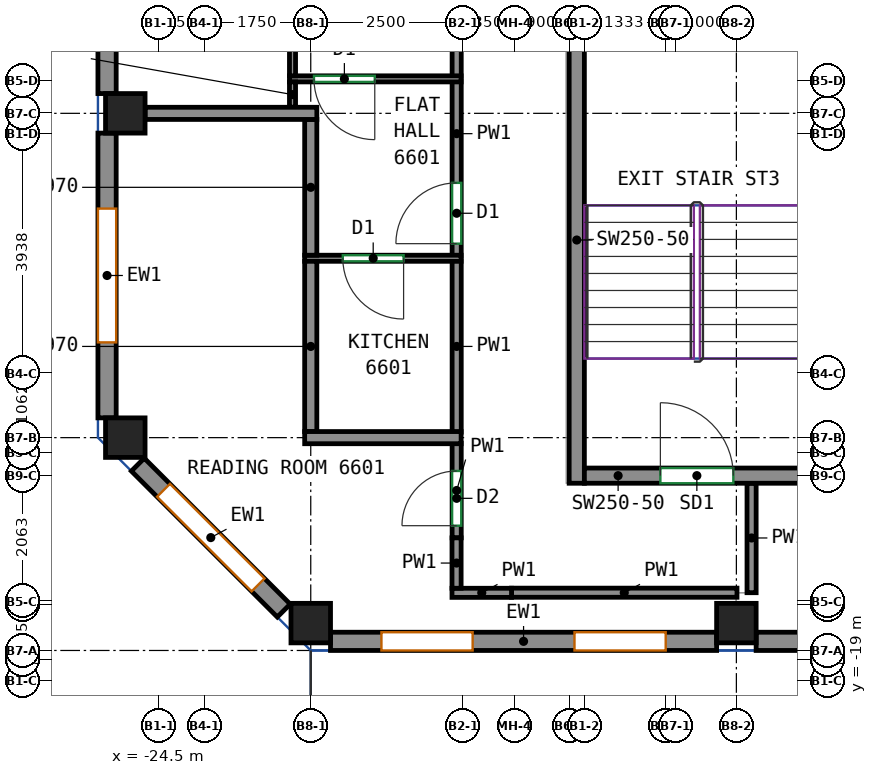
"""IFC4 building model, lengths in metres.
Left out: names, types, materials, properties, quantities, classifications, styles, units other than length and angle.
Written with IfcOpenShell. Run it as: python <this file> out.ifc"""

import sys

from ifc_helpers import new_model, si_unit, direction, frame, frame_2d, origin, origin_2d, place, context, subcontext, project, spatial, rectangle, extrude, source, transform, mapped, element, fill, save


model = new_model("IFC4")
c1 = context("Model", 3, precision=1e-05, world=origin(), true_north=direction((0.0, 1.0)))
c2 = subcontext(c1, "Body", "Model", "MODEL_VIEW")
j1 = project(units=[si_unit("LENGTHUNIT", "METRE"), si_unit("PLANEANGLEUNIT", "RADIAN")], contexts=[c1])
p1 = place(None, origin())
s1 = spatial("IfcSite", under=j1, at=p1, CompositionType="ELEMENT")
p2 = place(p1, origin())
s2 = spatial("IfcBuilding", under=s1, at=p2, CompositionType="ELEMENT")
p3 = place(p2, frame((0.0, 0.0, 270.4)))
s3 = spatial("IfcBuildingStorey", under=s2, at=p3, CompositionType="ELEMENT", Elevation=270.4)
m1 = source(origin(), c2, "Body", "SweptSolid", [
    extrude(rectangle(XDim=0.65, YDim=0.65, at=origin_2d()), origin(), (0.0, 0.0, 1.0), 3.12),
])
for number, where, z_axis, x_axis in (
    (1, (-25.05, -15.0, 0.0), (0.0, 0.0, 1.0), (1.0, 0.0, 0.0)),
    (2, (-25.05, -9.667, 0.0), (0.0, 0.0, 1.0), (1.0, 0.0, 0.0)),
    (3, (-22.0, -18.05, 0.0), (0.0, 0.0, 1.0), (1.0, 0.0, 0.0)),
    (4, (-15.0, -18.05, 0.0), (0.0, 0.0, 1.0), (1.0, 0.0, 0.0)),
):
    element("IfcColumn", number, at=place(p3, frame(where, z_axis=z_axis, x_axis=x_axis)), inside=s3, PredefinedType="COLUMN", context=c2, shape_type="MappedRepresentation", body=[
        mapped(m1, transform((0.0, 0.0, 0.0))),
    ])
m2 = source(origin(), c2, "Body", "SweptSolid", [
    extrude(rectangle(XDim=8.0, YDim=0.25, at=frame_2d((4.0, 0.0))), origin(), (0.0, 0.0, 1.0), 3.12),
])
p4 = place(p3, frame((-17.625, -15.75, 0.0), z_axis=(0.0, 0.0, 1.0), x_axis=(0.0, 1.0, 0.0)))
e5 = element("IfcWall", 5, at=p4, inside=s3, PredefinedType="SHEAR", context=c2, shape_type="MappedRepresentation", body=[
    mapped(m2, transform((0.0, 0.0, 0.0))),
])
m3 = source(origin(), c2, "Body", "SweptSolid", [
    extrude(rectangle(XDim=3.7, YDim=0.25, at=frame_2d((1.85, 0.0))), origin(), (0.0, 0.0, 1.0), 3.12),
])
p5 = place(p3, frame((-17.5, -15.625, 0.0), z_axis=(0.0, 0.0, 1.0), x_axis=(1.0, 0.0, 0.0)))
e6 = element("IfcWall", 6, at=p5, inside=s3, PredefinedType="SHEAR", context=c2, shape_type="MappedRepresentation", body=[
    mapped(m3, transform((0.0, 0.0, 0.0))),
])
p6 = place(p5, frame((1.25, 0.0, 0.0)))
e7 = element("IfcOpeningElement", 7, at=p6, cuts=e6, PredefinedType="OPENING", context=c2, shape_type="SweptSolid", body=[
    extrude(rectangle(XDim=1.2, YDim=2.1, at=frame_2d((0.6, 1.05))), frame((0.0, 0.135, 0.0), z_axis=(0.0, -1.0, 0.0), x_axis=(1.0, 0.0, 0.0)), (0.0, 0.0, 1.0), 0.27),
])
m4 = source(origin(), c2, "Body", "SweptSolid", [
    extrude(rectangle(XDim=6.35, YDim=0.3, at=frame_2d((3.175, 0.0))), origin(), (0.0, 0.0, 1.0), 3.12),
])
p7 = place(p3, frame((-21.675, -18.35, 0.0), z_axis=(0.0, 0.0, 1.0), x_axis=(1.0, 0.0, 0.0)))
e8 = element("IfcWall", 8, at=p7, inside=s3, PredefinedType="SOLIDWALL", context=c2, shape_type="MappedRepresentation", body=[
    mapped(m4, transform((0.0, 0.0, 0.0))),
])
p8 = place(p7, frame((0.837, 0.0, 0.8)))
e9 = element("IfcOpeningElement", 9, at=p8, cuts=e8, PredefinedType="OPENING", context=c2, shape_type="SweptSolid", body=[
    extrude(rectangle(XDim=1.5, YDim=2.05, at=frame_2d((0.75, 1.025))), frame((0.0, 0.16, 0.0), z_axis=(0.0, -1.0, 0.0), x_axis=(1.0, 0.0, 0.0)), (0.0, 0.0, 1.0), 0.32),
])
p9 = place(p7, frame((4.012, 0.0, 0.8)))
e10 = element("IfcOpeningElement", 10, at=p9, cuts=e8, PredefinedType="OPENING", context=c2, shape_type="SweptSolid", body=[
    extrude(rectangle(XDim=1.5, YDim=2.05, at=frame_2d((0.75, 1.025))), frame((0.0, 0.16, 0.0), z_axis=(0.0, -1.0, 0.0), x_axis=(1.0, 0.0, 0.0)), (0.0, 0.0, 1.0), 0.32),
])
p10 = place(p3, frame((-14.675, -18.35, 0.0), z_axis=(0.0, 0.0, 1.0), x_axis=(1.0, 0.0, 0.0)))
e11 = element("IfcWall", 11, at=p10, inside=s3, PredefinedType="SOLIDWALL", context=c2, shape_type="MappedRepresentation", body=[
    mapped(m4, transform((0.0, 0.0, 0.0))),
])
p11 = place(p10, frame((0.837, 0.0, 0.8)))
e12 = element("IfcOpeningElement", 12, at=p11, cuts=e11, PredefinedType="OPENING", context=c2, shape_type="SweptSolid", body=[
    extrude(rectangle(XDim=1.5, YDim=2.05, at=frame_2d((0.75, 1.025))), frame((0.0, 0.16, 0.0), z_axis=(0.0, -1.0, 0.0), x_axis=(1.0, 0.0, 0.0)), (0.0, 0.0, 1.0), 0.32),
])
p12 = place(p10, frame((4.012, 0.0, 0.8)))
e13 = element("IfcOpeningElement", 13, at=p12, cuts=e11, PredefinedType="OPENING", context=c2, shape_type="SweptSolid", body=[
    extrude(rectangle(XDim=1.5, YDim=2.05, at=frame_2d((0.75, 1.025))), frame((0.0, 0.16, 0.0), z_axis=(0.0, -1.0, 0.0), x_axis=(1.0, 0.0, 0.0)), (0.0, 0.0, 1.0), 0.32),
])
m5 = source(origin(), c2, "Body", "SweptSolid", [
    extrude(rectangle(XDim=8.184, YDim=0.3, at=frame_2d((4.092, 0.0))), origin(), (0.0, 0.0, 1.0), 3.12),
])
p13 = place(p3, frame((-25.35, -1.158, 0.0), z_axis=(0.0, 0.0, 1.0), x_axis=(0.0, -1.0, 0.0)))
e14 = element("IfcWall", 14, at=p13, inside=s3, PredefinedType="SOLIDWALL", context=c2, shape_type="MappedRepresentation", body=[
    mapped(m5, transform((0.0, 0.0, 0.0))),
])
p14 = place(p13, frame((0.946, 0.0, 0.8)))
e15 = element("IfcOpeningElement", 15, at=p14, cuts=e14, PredefinedType="OPENING", context=c2, shape_type="SweptSolid", body=[
    extrude(rectangle(XDim=2.2, YDim=2.05, at=frame_2d((1.1, 1.025))), frame((0.0, 0.16, 0.0), z_axis=(0.0, -1.0, 0.0), x_axis=(1.0, 0.0, 0.0)), (0.0, 0.0, 1.0), 0.32),
])
p15 = place(p13, frame((5.038, 0.0, 0.8)))
e16 = element("IfcOpeningElement", 16, at=p15, cuts=e14, PredefinedType="OPENING", context=c2, shape_type="SweptSolid", body=[
    extrude(rectangle(XDim=2.2, YDim=2.05, at=frame_2d((1.1, 1.025))), frame((0.0, 0.16, 0.0), z_axis=(0.0, -1.0, 0.0), x_axis=(1.0, 0.0, 0.0)), (0.0, 0.0, 1.0), 0.32),
])
m6 = source(origin(), c2, "Body", "SweptSolid", [
    extrude(rectangle(XDim=4.683, YDim=0.3, at=frame_2d((2.342, 0.0))), origin(), (0.0, 0.0, 1.0), 3.12),
])
p16 = place(p3, frame((-25.35, -9.992, 0.0), z_axis=(0.0, 0.0, 1.0), x_axis=(0.0, -1.0, 0.0)))
e17 = element("IfcWall", 17, at=p16, inside=s3, PredefinedType="SOLIDWALL", context=c2, shape_type="MappedRepresentation", body=[
    mapped(m6, transform((0.0, 0.0, 0.0))),
])
p17 = place(p16, frame((1.242, 0.0, 0.8)))
e18 = element("IfcOpeningElement", 18, at=p17, cuts=e17, PredefinedType="OPENING", context=c2, shape_type="SweptSolid", body=[
    extrude(rectangle(XDim=2.2, YDim=2.05, at=frame_2d((1.1, 1.025))), frame((0.0, 0.16, 0.0), z_axis=(0.0, -1.0, 0.0), x_axis=(1.0, 0.0, 0.0)), (0.0, 0.0, 1.0), 0.32),
])
m7 = source(origin(), c2, "Body", "SweptSolid", [
    extrude(rectangle(XDim=3.394, YDim=0.3, at=frame_2d((1.697, 0.0))), origin(), (0.0, 0.0, 1.0), 3.12),
])
p18 = place(p3, frame((-24.844, -15.444, 0.0), z_axis=(0.0, 0.0, 1.0), x_axis=(0.707070815327, -0.707142745217, 0.0)))
e19 = element("IfcWall", 19, at=p18, inside=s3, PredefinedType="SOLIDWALL", context=c2, shape_type="MappedRepresentation", body=[
    mapped(m7, transform((0.0, 0.0, 0.0))),
])
p19 = place(p18, frame((0.597, 0.0, 0.8)))
e20 = element("IfcOpeningElement", 20, at=p19, cuts=e19, PredefinedType="OPENING", context=c2, shape_type="SweptSolid", body=[
    extrude(rectangle(XDim=2.2, YDim=2.05, at=frame_2d((1.1, 1.025))), frame((0.0, 0.16, 0.0), z_axis=(0.0, -1.0, 0.0), x_axis=(1.0, 0.0, 0.0)), (0.0, 0.0, 1.0), 0.32),
])
p20 = place(p3, frame((-19.6, -14.91, 0.0), z_axis=(0.0, 0.0, 1.0), x_axis=(0.0, 1.0, 0.0)))
e21 = element("IfcWall", 21, at=p20, inside=s3, PredefinedType="PARTITIONING", context=c2, shape_type="SweptSolid", body=[
    extrude(rectangle(XDim=2.82, YDim=0.15, at=frame_2d((1.41, 0.0))), origin(), (0.0, 0.0, 1.0), 3.12),
])
p21 = place(p3, frame((-19.6, -12.01, 0.0), z_axis=(0.0, 0.0, 1.0), x_axis=(0.0, 1.0, 0.0)))
e22 = element("IfcWall", 22, at=p21, inside=s3, PredefinedType="PARTITIONING", context=c2, shape_type="SweptSolid", body=[
    extrude(rectangle(XDim=2.87, YDim=0.15, at=frame_2d((1.435, 0.0))), origin(), (0.0, 0.0, 1.0), 3.12),
])
p22 = place(p21, frame((0.2, 0.0, 0.0)))
e23 = element("IfcOpeningElement", 23, at=p22, cuts=e22, PredefinedType="OPENING", context=c2, shape_type="SweptSolid", body=[
    extrude(rectangle(XDim=1.0, YDim=2.1, at=frame_2d((0.5, 1.05))), frame((0.0, 0.085, 0.0), z_axis=(0.0, -1.0, 0.0), x_axis=(1.0, 0.0, 0.0)), (0.0, 0.0, 1.0), 0.17),
])
p23 = place(p3, frame((-19.6, -9.06, 0.0), z_axis=(0.0, 0.0, 1.0), x_axis=(0.0, 1.0, 0.0)))
e24 = element("IfcWall", 24, at=p23, inside=s3, PredefinedType="PARTITIONING", context=c2, shape_type="SweptSolid", body=[
    extrude(rectangle(XDim=1.608, YDim=0.15, at=frame_2d((0.804, 0.0))), origin(), (0.0, 0.0, 1.0), 3.12),
])
p24 = place(p3, frame((-14.75, -17.55, 0.0), z_axis=(0.0, 0.0, 1.0), x_axis=(0.0, 1.0, 0.0)))
e25 = element("IfcWall", 25, at=p24, inside=s3, PredefinedType="PARTITIONING", context=c2, shape_type="SweptSolid", body=[
    extrude(rectangle(XDim=1.8, YDim=0.15, at=frame_2d((0.9, 0.0))), origin(), (0.0, 0.0, 1.0), 3.12),
])
p25 = place(p3, frame((-19.6, -16.648, 0.0), z_axis=(0.0, 0.0, 1.0), x_axis=(0.0, 1.0, 0.0)))
e26 = element("IfcWall", 26, at=p25, inside=s3, PredefinedType="PARTITIONING", context=c2, shape_type="SweptSolid", body=[
    extrude(rectangle(XDim=1.558, YDim=0.15, at=frame_2d((0.779, 0.0))), origin(), (0.0, 0.0, 1.0), 3.12),
])
p26 = place(p25, frame((0.2, 0.0, 0.0)))
e27 = element("IfcOpeningElement", 27, at=p26, cuts=e26, PredefinedType="OPENING", context=c2, shape_type="SweptSolid", body=[
    extrude(rectangle(XDim=0.9, YDim=2.1, at=frame_2d((0.45, 1.05))), frame((0.0, 0.085, 0.0), z_axis=(0.0, -1.0, 0.0), x_axis=(1.0, 0.0, 0.0)), (0.0, 0.0, 1.0), 0.17),
])
p27 = place(p3, frame((-18.698, -17.55, 0.0), z_axis=(0.0, 0.0, 1.0), x_axis=(1.0, 0.0, 0.0)))
e28 = element("IfcWall", 28, at=p27, inside=s3, PredefinedType="PARTITIONING", context=c2, shape_type="SweptSolid", body=[
    extrude(rectangle(XDim=3.708, YDim=0.15, at=frame_2d((1.854, 0.0))), origin(), (0.0, 0.0, 1.0), 3.12),
])
p28 = place(p3, frame((-19.677, -17.552, 0.0), z_axis=(0.0, 0.0, 1.0), x_axis=(1.0, 0.0, 0.0)))
e29 = element("IfcWall", 29, at=p28, inside=s3, PredefinedType="PARTITIONING", context=c2, shape_type="SweptSolid", body=[
    extrude(rectangle(XDim=0.979, YDim=0.15, at=frame_2d((0.49, 0.0))), origin(), (0.0, 0.0, 1.0), 3.12),
])
p29 = place(p3, frame((-19.602, -17.477, 0.0), z_axis=(0.0, 0.0, 1.0), x_axis=(0.0, 1.0, 0.0)))
e30 = element("IfcWall", 30, at=p29, inside=s3, PredefinedType="PARTITIONING", context=c2, shape_type="SweptSolid", body=[
    extrude(rectangle(XDim=0.829, YDim=0.15, at=frame_2d((0.415, 0.0))), origin(), (0.0, 0.0, 1.0), 3.12),
])
p30 = place(p3, frame((-19.527, -12.05, 0.0), z_axis=(0.0, 0.0, 1.0), x_axis=(-1.0, 0.0, 0.0)))
e31 = element("IfcWall", 31, at=p30, inside=s3, PredefinedType="PARTITIONING", context=c2, shape_type="SweptSolid", body=[
    extrude(rectangle(XDim=2.573, YDim=0.1, at=frame_2d((1.287, 0.0))), origin(), (0.0, 0.0, 1.0), 3.12),
])
p31 = place(p30, frame((0.946, 0.0, 0.0)))
e32 = element("IfcOpeningElement", 32, at=p31, cuts=e31, PredefinedType="OPENING", context=c2, shape_type="SweptSolid", body=[
    extrude(rectangle(XDim=1.0, YDim=2.1, at=frame_2d((0.5, 1.05))), frame((0.0, 0.06, 0.0), z_axis=(0.0, -1.0, 0.0), x_axis=(1.0, 0.0, 0.0)), (0.0, 0.0, 1.0), 0.12),
])
p32 = place(p3, frame((-22.0, -14.9, 0.0), z_axis=(0.0, 0.0, 1.0), x_axis=(0.0, 1.0, 0.0)))
e33 = element("IfcWall", 33, at=p32, inside=s3, PredefinedType="PARTITIONING", context=c2, shape_type="SweptSolid", body=[
    extrude(rectangle(XDim=2.8, YDim=0.2, at=frame_2d((1.4, 0.0))), origin(), (0.0, 0.0, 1.0), 2.57),
])
p33 = place(p3, frame((-22.1, -15.0, 0.0), z_axis=(0.0, 0.0, 1.0), x_axis=(1.0, 0.0, 0.0)))
e34 = element("IfcWall", 34, at=p33, inside=s3, PredefinedType="PARTITIONING", context=c2, shape_type="SweptSolid", body=[
    extrude(rectangle(XDim=2.573, YDim=0.2, at=frame_2d((1.287, 0.0))), origin(), (0.0, 0.0, 1.0), 3.12),
])
p34 = place(p3, frame((-19.527, -9.1, 0.0), z_axis=(0.0, 0.0, 1.0), x_axis=(-1.0, 0.0, 0.0)))
e35 = element("IfcWall", 35, at=p34, inside=s3, PredefinedType="PARTITIONING", context=c2, shape_type="SweptSolid", body=[
    extrude(rectangle(XDim=2.823, YDim=0.1, at=frame_2d((1.412, 0.0))), origin(), (0.0, 0.0, 1.0), 3.12),
])
p35 = place(p34, frame((1.42, 0.0, 0.0)))
e36 = element("IfcOpeningElement", 36, at=p35, cuts=e35, PredefinedType="OPENING", context=c2, shape_type="SweptSolid", body=[
    extrude(rectangle(XDim=1.0, YDim=2.1, at=frame_2d((0.5, 1.05))), frame((0.0, 0.06, 0.0), z_axis=(0.0, -1.0, 0.0), x_axis=(1.0, 0.0, 0.0)), (0.0, 0.0, 1.0), 0.12),
])
p36 = place(p3, frame((-22.3, -9.567, 0.0), z_axis=(0.0, 0.0, 1.0), x_axis=(0.0, 1.0, 0.0)))
e37 = element("IfcWall", 37, at=p36, inside=s3, PredefinedType="PARTITIONING", context=c2, shape_type="SweptSolid", body=[
    extrude(rectangle(XDim=0.417, YDim=0.1, at=frame_2d((0.208, 0.0))), origin(), (0.0, 0.0, 1.0), 2.57),
])
p37 = place(p3, frame((-22.0, -12.0, 0.0), z_axis=(0.0, 0.0, 1.0), x_axis=(0.0, 1.0, 0.0)))
e38 = element("IfcWall", 38, at=p37, inside=s3, PredefinedType="PARTITIONING", context=c2, shape_type="SweptSolid", body=[
    extrude(rectangle(XDim=2.233, YDim=0.2, at=frame_2d((1.116, 0.0))), origin(), (0.0, 0.0, 1.0), 2.57),
])
p38 = place(p3, frame((-22.3, -9.05, 0.0), z_axis=(0.0, 0.0, 1.0), x_axis=(0.0, 1.0, 0.0)))
e39 = element("IfcWall", 39, at=p38, inside=s3, PredefinedType="PARTITIONING", context=c2, shape_type="SweptSolid", body=[
    extrude(rectangle(XDim=2.85, YDim=0.1, at=frame_2d((1.425, 0.0))), origin(), (0.0, 0.0, 1.0), 2.57),
])
p39 = place(p3, frame((-24.725, -9.667, 0.0), z_axis=(0.0, 0.0, 1.0), x_axis=(1.0, 0.0, 0.0)))
e40 = element("IfcWall", 40, at=p39, inside=s3, PredefinedType="PARTITIONING", context=c2, shape_type="SweptSolid", body=[
    extrude(rectangle(XDim=2.825, YDim=0.2, at=frame_2d((1.413, 0.0))), origin(), (0.0, 0.0, 1.0), 3.12),
])
p40 = place(p8, origin())
e41 = element("IfcWindow", 41, at=p40, inside=s3, PartitioningType="SINGLE_PANEL", PredefinedType="WINDOW", context=c2, shape_type="SweptSolid", body=[
    extrude(rectangle(XDim=1.5, YDim=2.05, at=frame_2d((0.75, 1.025))), frame((0.0, 0.03, 0.0), z_axis=(0.0, -1.0, 0.0), x_axis=(1.0, 0.0, 0.0)), (0.0, 0.0, 1.0), 0.06),
])
fill(e9, e41)
p41 = place(p9, origin())
e42 = element("IfcWindow", 42, at=p41, inside=s3, PartitioningType="SINGLE_PANEL", PredefinedType="WINDOW", context=c2, shape_type="SweptSolid", body=[
    extrude(rectangle(XDim=1.5, YDim=2.05, at=frame_2d((0.75, 1.025))), frame((0.0, 0.03, 0.0), z_axis=(0.0, -1.0, 0.0), x_axis=(1.0, 0.0, 0.0)), (0.0, 0.0, 1.0), 0.06),
])
fill(e10, e42)
p42 = place(p17, origin())
e43 = element("IfcWindow", 43, at=p42, inside=s3, PartitioningType="SINGLE_PANEL", PredefinedType="WINDOW", context=c2, shape_type="SweptSolid", body=[
    extrude(rectangle(XDim=2.2, YDim=2.05, at=frame_2d((1.1, 1.025))), frame((0.0, 0.03, 0.0), z_axis=(0.0, -1.0, 0.0), x_axis=(1.0, 0.0, 0.0)), (0.0, 0.0, 1.0), 0.06),
])
fill(e18, e43)
p43 = place(p19, origin())
e44 = element("IfcWindow", 44, at=p43, inside=s3, PartitioningType="SINGLE_PANEL", PredefinedType="WINDOW", context=c2, shape_type="SweptSolid", body=[
    extrude(rectangle(XDim=2.2, YDim=2.05, at=frame_2d((1.1, 1.025))), frame((0.0, 0.03, 0.0), z_axis=(0.0, -1.0, 0.0), x_axis=(1.0, 0.0, 0.0)), (0.0, 0.0, 1.0), 0.06),
])
fill(e20, e44)
p44 = place(p6, origin())
e45 = element("IfcDoor", 45, at=p44, inside=s3, OperationType="DOUBLE_DOOR_SINGLE_SWING", PredefinedType="DOOR", context=c2, shape_type="SweptSolid", body=[
    extrude(rectangle(XDim=1.2, YDim=2.1, at=frame_2d((0.6, 1.05))), frame((0.0, 0.025, 0.0), z_axis=(0.0, -1.0, 0.0), x_axis=(1.0, 0.0, 0.0)), (0.0, 0.0, 1.0), 0.05),
])
fill(e7, e45)
p45 = place(p26, origin())
e46 = element("IfcDoor", 46, at=p45, inside=s3, OperationType="SINGLE_SWING_LEFT", PredefinedType="DOOR", context=c2, shape_type="SweptSolid", body=[
    extrude(rectangle(XDim=0.9, YDim=2.1, at=frame_2d((0.45, 1.05))), frame((0.0, 0.025, 0.0), z_axis=(0.0, -1.0, 0.0), x_axis=(1.0, 0.0, 0.0)), (0.0, 0.0, 1.0), 0.05),
])
fill(e27, e46)
p46 = place(p31, origin())
e47 = element("IfcDoor", 47, at=p46, inside=s3, OperationType="SINGLE_SWING_LEFT", PredefinedType="DOOR", context=c2, shape_type="SweptSolid", body=[
    extrude(rectangle(XDim=1.0, YDim=2.1, at=frame_2d((0.5, 1.05))), frame((0.0, 0.025, 0.0), z_axis=(0.0, -1.0, 0.0), x_axis=(1.0, 0.0, 0.0)), (0.0, 0.0, 1.0), 0.05),
])
fill(e32, e47)
p47 = place(p22, origin())
e48 = element("IfcDoor", 48, at=p47, inside=s3, OperationType="SINGLE_SWING_LEFT", PredefinedType="DOOR", context=c2, shape_type="SweptSolid", body=[
    extrude(rectangle(XDim=1.0, YDim=2.1, at=frame_2d((0.5, 1.05))), frame((0.0, 0.025, 0.0), z_axis=(0.0, -1.0, 0.0), x_axis=(1.0, 0.0, 0.0)), (0.0, 0.0, 1.0), 0.05),
])
fill(e23, e48)
p48 = place(p35, origin())
e49 = element("IfcDoor", 49, at=p48, inside=s3, OperationType="SINGLE_SWING_LEFT", PredefinedType="DOOR", context=c2, shape_type="SweptSolid", body=[
    extrude(rectangle(XDim=1.0, YDim=2.1, at=frame_2d((0.5, 1.05))), frame((0.0, 0.025, 0.0), z_axis=(0.0, -1.0, 0.0), x_axis=(1.0, 0.0, 0.0)), (0.0, 0.0, 1.0), 0.05),
])
fill(e36, e49)
save(model, sys.argv[1])
